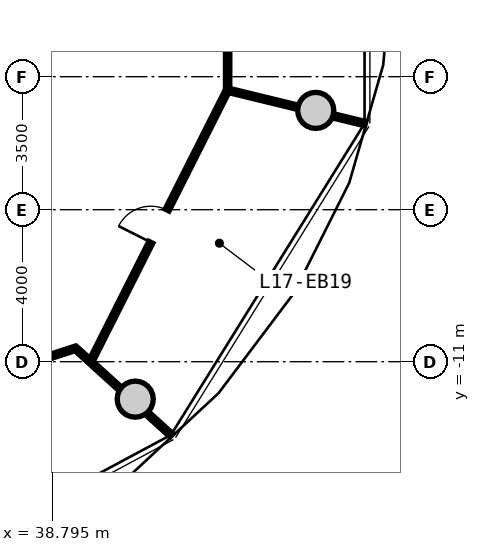
"""IFC4 building model, lengths in metres.
Left out: names, types, materials, properties, quantities, classifications, styles, units other than length and angle.
Written with IfcOpenShell. Run it as: python <this file> out.ifc"""

import sys

from ifc_helpers import new_model, si_unit, direction, frame, frame_2d, origin, origin_2d, place, context, subcontext, project, spatial, rectangle, circle, extrude, source, transform, mapped, element, fill, save


model = new_model("IFC4")
c1 = context("Model", 3, precision=1e-05, world=origin(), true_north=direction((0.0, 1.0)))
c2 = subcontext(c1, "Body", "Model", "MODEL_VIEW")
j1 = project(units=[si_unit("LENGTHUNIT", "METRE"), si_unit("PLANEANGLEUNIT", "RADIAN")], contexts=[c1])
p1 = place(None, origin())
s1 = spatial("IfcSite", under=j1, at=p1, CompositionType="ELEMENT")
p2 = place(p1, origin())
s2 = spatial("IfcBuilding", under=s1, at=p2, CompositionType="ELEMENT")
p3 = place(p2, frame((0.0, 0.0, 58.2)))
s3 = spatial("IfcBuildingStorey", under=s2, at=p3, CompositionType="ELEMENT", Elevation=58.2)
m1 = source(origin(), c2, "Body", "SweptSolid", [
    extrude(circle(Radius=0.475, at=origin_2d()), origin(), (0.0, 0.0, 1.0), 3.05),
])
for number, where, z_axis, x_axis in (
    (1, (40.975, -11.985, 0.0), (0.0, 0.0, 1.0), (1.0, 0.0, 0.0)),
    (2, (45.725, -4.387, 0.0), (0.0, 0.0, 1.0), (1.0, 0.0, 0.0)),
):
    element("IfcColumn", number, at=place(p3, frame(where, z_axis=z_axis, x_axis=x_axis)), inside=s3, PredefinedType="COLUMN", context=c2, shape_type="MappedRepresentation", body=[
        mapped(m1, transform((0.0, 0.0, 0.0), x_axis=(1.0, 0.0, 0.0), y_axis=(0.0, 1.0, 0.0), z_axis=(0.0, 0.0, 1.0), scale=1.0)),
    ])
m2 = source(origin(), c2, "Body", "SweptSolid", [
    extrude(rectangle(XDim=8.018, YDim=0.115, at=frame_2d((4.009, 0.0))), origin(), (0.0, 0.0, 1.0), 2.775),
])
p4 = place(p3, frame((39.795, -11.014, 0.0), z_axis=(0.0, 0.0, 1.0), x_axis=(0.450134355233, 0.89296084026, 0.0)))
e3 = element("IfcWall", 3, at=p4, inside=s3, PredefinedType="PARTITIONING", context=c2, shape_type="MappedRepresentation", body=[
    mapped(m2, transform((0.0, 0.0, 0.0), x_axis=(1.0, 0.0, 0.0), y_axis=(0.0, 1.0, 0.0), z_axis=(0.0, 0.0, 1.0), scale=1.0)),
])
p5 = place(p4, frame((3.534, 0.0, 0.0)))
e4 = element("IfcOpeningElement", 4, at=p5, cuts=e3, PredefinedType="OPENING", context=c2, shape_type="SweptSolid", body=[
    extrude(rectangle(XDim=0.95, YDim=2.1, at=frame_2d((0.475, 1.05))), frame((0.0, 0.067, 0.0), z_axis=(0.0, -1.0, 0.0), x_axis=(1.0, 0.0, 0.0)), (0.0, 0.0, 1.0), 0.135),
])
m3 = source(origin(), c2, "Body", "SweptSolid", [
    extrude(rectangle(XDim=3.4, YDim=0.115, at=frame_2d((1.7, 0.0))), origin(), (0.0, 0.0, 1.0), 2.225),
])
p6 = place(p3, frame((39.411, -10.656, 0.0), z_axis=(0.0, 0.0, 1.0), x_axis=(0.740729005272, -0.671803945172, 0.0)))
e5 = element("IfcWall", 5, at=p6, inside=s3, PredefinedType="PARTITIONING", context=c2, shape_type="MappedRepresentation", body=[
    mapped(m3, transform((0.0, 0.0, 0.0), x_axis=(1.0, 0.0, 0.0), y_axis=(0.0, 1.0, 0.0), z_axis=(0.0, 0.0, 1.0), scale=1.0)),
])
m4 = source(origin(), c2, "Body", "SweptSolid", [
    extrude(rectangle(XDim=7.709, YDim=0.115, at=frame_2d((3.855, 0.0))), origin(), (0.0, 0.0, 1.0), 2.775),
])
p7 = place(p3, frame((43.406, -3.855, 0.0), z_axis=(0.0, 0.0, 1.0), x_axis=(0.0, 1.0, 0.0)))
e6 = element("IfcWall", 6, at=p7, inside=s3, PredefinedType="PARTITIONING", context=c2, shape_type="MappedRepresentation", body=[
    mapped(m4, transform((0.0, 0.0, 0.0), x_axis=(1.0, 0.0, 0.0), y_axis=(0.0, 1.0, 0.0), z_axis=(0.0, 0.0, 1.0), scale=1.0)),
])
p8 = place(p7, frame((3.38, 0.0, 0.0)))
e7 = element("IfcOpeningElement", 7, at=p8, cuts=e6, PredefinedType="OPENING", context=c2, shape_type="SweptSolid", body=[
    extrude(rectangle(XDim=0.95, YDim=2.1, at=frame_2d((0.475, 1.05))), frame((0.0, 0.067, 0.0), z_axis=(0.0, -1.0, 0.0), x_axis=(1.0, 0.0, 0.0)), (0.0, 0.0, 1.0), 0.135),
])
m5 = source(origin(), c2, "Body", "SweptSolid", [
    extrude(rectangle(XDim=3.728, YDim=0.115, at=frame_2d((1.864, 0.0))), origin(), (0.0, 0.0, 1.0), 2.225),
])
p9 = place(p3, frame((43.406, -3.855, 0.0), z_axis=(0.0, 0.0, 1.0), x_axis=(0.971641177968, -0.236460189624, 0.0)))
e8 = element("IfcWall", 8, at=p9, inside=s3, PredefinedType="PARTITIONING", context=c2, shape_type="MappedRepresentation", body=[
    mapped(m5, transform((0.0, 0.0, 0.0), x_axis=(1.0, 0.0, 0.0), y_axis=(0.0, 1.0, 0.0), z_axis=(0.0, 0.0, 1.0), scale=1.0)),
])
m6 = source(origin(), c2, "Body", "SweptSolid", [
    extrude(rectangle(XDim=4.22, YDim=0.115, at=frame_2d((2.11, 0.0))), origin(), (0.0, 0.0, 1.0), 2.775),
])
p10 = place(p3, frame((35.389, -11.95, 0.0), z_axis=(0.0, 0.0, 1.0), x_axis=(0.951130539873, 0.308789080315, 0.0)))
e9 = element("IfcWall", 9, at=p10, inside=s3, PredefinedType="PARTITIONING", context=c2, shape_type="MappedRepresentation", body=[
    mapped(m6, transform((0.0, 0.0, 0.0), x_axis=(1.0, 0.0, 0.0), y_axis=(0.0, 1.0, 0.0), z_axis=(0.0, 0.0, 1.0), scale=1.0)),
])
p11 = place(p10, frame((1.635, 0.0, 0.0)))
e10 = element("IfcOpeningElement", 10, at=p11, cuts=e9, PredefinedType="OPENING", context=c2, shape_type="SweptSolid", body=[
    extrude(rectangle(XDim=0.95, YDim=2.1, at=frame_2d((0.475, 1.05))), frame((0.0, 0.067, 0.0), z_axis=(0.0, -1.0, 0.0), x_axis=(1.0, 0.0, 0.0)), (0.0, 0.0, 1.0), 0.135),
])
m7 = source(origin(), c2, "Body", "SweptSolid", [
    extrude(rectangle(XDim=0.95, YDim=2.1, at=frame_2d((0.475, 1.05))), frame((0.0, 0.025, 0.0), z_axis=(0.0, -1.0, 0.0), x_axis=(1.0, 0.0, 0.0)), (0.0, 0.0, 1.0), 0.05),
])
p12 = place(p5, origin())
e11 = element("IfcDoor", 11, at=p12, inside=s3, OperationType="SINGLE_SWING_LEFT", PredefinedType="DOOR", context=c2, shape_type="MappedRepresentation", body=[
    mapped(m7, transform((0.0, 0.0, 0.0), x_axis=(1.0, 0.0, 0.0), y_axis=(0.0, 1.0, 0.0), z_axis=(0.0, 0.0, 1.0), scale=1.0)),
])
fill(e4, e11)
save(model, sys.argv[1])
